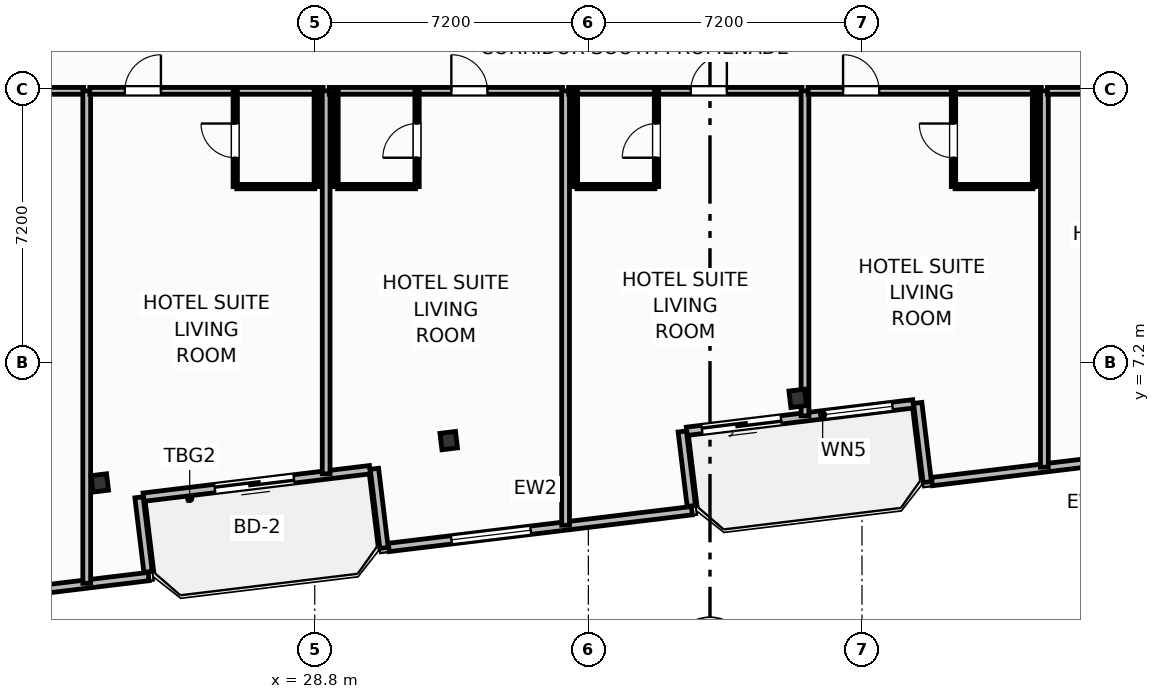
"""IFC4 building model, lengths in metres.
Left out: names, types, materials, properties, quantities, classifications, styles, units other than length and angle.
Written with IfcOpenShell. Run it as: python <this file> out.ifc"""

import sys

from ifc_helpers import new_model, si_unit, direction, frame, frame_2d, origin, origin_2d, place, context, subcontext, project, spatial, rectangle, i_section, extrude, element, fill, save


model = new_model("IFC4")
c1 = context("Model", 3, precision=1e-05, world=origin(), true_north=direction((0.0, 1.0)))
c2 = subcontext(c1, "Body", "Model", "MODEL_VIEW")
j1 = project(units=[si_unit("LENGTHUNIT", "METRE"), si_unit("PLANEANGLEUNIT", "RADIAN")], contexts=[c1])
p1 = place(None, origin())
s1 = spatial("IfcSite", under=j1, at=p1, CompositionType="ELEMENT")
p2 = place(p1, origin())
s2 = spatial("IfcBuilding", under=s1, at=p2, CompositionType="ELEMENT")
p3 = place(p2, frame((0.0, 0.0, 200.5)))
s3 = spatial("IfcBuildingStorey", under=s2, at=p3, CompositionType="ELEMENT", Elevation=200.5)
for number, where, z_axis, x_axis in (
    (1, (23.143, 4.033, 0.0), (0.0, 0.0, 1.0), (0.993, 0.12, 0.0)),
    (2, (32.325, 5.146, 0.0), (0.0, 0.0, 1.0), (0.993, 0.12, 0.0)),
    (3, (41.508, 6.26, 0.0), (0.0, 0.0, 1.0), (0.993, 0.12, 0.0)),
):
    element("IfcColumn", number, at=place(p3, frame(where, z_axis=z_axis, x_axis=x_axis)), inside=s3, PredefinedType="COLUMN", context=c2, shape_type="SweptSolid", body=[
        extrude(i_section(OverallWidth=0.412, OverallDepth=0.435, WebThickness=0.036, FlangeThickness=0.057, FilletRadius=0.025, at=origin_2d()), origin(), (0.0, 0.0, 1.0), 3.7),
    ])
p4 = place(p3, frame((30.252, 4.381, 0.0), z_axis=(0.0, 0.0, 1.0), x_axis=(-0.992735402148, -0.120318000826, 0.0)))
e4 = element("IfcWall", 4, at=p4, inside=s3, PredefinedType="SOLIDWALL", context=c2, shape_type="SweptSolid", body=[
    extrude(rectangle(XDim=6.0, YDim=0.22, at=frame_2d((3.0, 0.0))), origin(), (0.0, 0.0, 1.0), 2.73),
])
p5 = place(p4, frame((2.012, 0.0, 0.0)))
e5 = element("IfcOpeningElement", 5, at=p5, cuts=e4, PredefinedType="OPENING", context=c2, shape_type="SweptSolid", body=[
    extrude(rectangle(XDim=2.1, YDim=2.3, at=frame_2d((1.05, 1.15))), frame((0.0, 0.12, 0.0), z_axis=(0.0, -1.0, 0.0), x_axis=(1.0, 0.0, 0.0)), (0.0, 0.0, 1.0), 0.24),
])
p6 = place(p3, frame((44.548, 6.114, 0.0), z_axis=(0.0, 0.0, 1.0), x_axis=(-0.992735402148, -0.120318000826, 0.0)))
e6 = element("IfcWall", 6, at=p6, inside=s3, PredefinedType="SOLIDWALL", context=c2, shape_type="SweptSolid", body=[
    extrude(rectangle(XDim=6.0, YDim=0.22, at=frame_2d((3.0, 0.0))), origin(), (0.0, 0.0, 1.0), 2.73),
])
p7 = place(p6, frame((3.5, 0.0, 0.0)))
e7 = element("IfcOpeningElement", 7, at=p7, cuts=e6, PredefinedType="OPENING", context=c2, shape_type="SweptSolid", body=[
    extrude(rectangle(XDim=2.1, YDim=2.3, at=frame_2d((1.05, 1.15))), frame((0.0, 0.12, 0.0), z_axis=(0.0, -1.0, 0.0), x_axis=(1.0, 0.0, 0.0)), (0.0, 0.0, 1.0), 0.24),
])
p8 = place(p6, frame((0.55, 0.0, 0.75)))
e8 = element("IfcOpeningElement", 8, at=p8, cuts=e6, PredefinedType="OPENING", context=c2, shape_type="SweptSolid", body=[
    extrude(rectangle(XDim=1.85, YDim=1.75, at=frame_2d((0.925, 0.875))), frame((0.0, 0.12, 0.0), z_axis=(0.0, -1.0, 0.0), x_axis=(1.0, 0.0, 0.0)), (0.0, 0.0, 1.0), 0.24),
])
p9 = place(p3, frame((11.972, 0.06, 0.0), z_axis=(0.0, 0.0, 1.0), x_axis=(0.992732021049, 0.120345894751, 0.0)))
e9 = element("IfcWall", 9, at=p9, inside=s3, PredefinedType="SOLIDWALL", context=c2, shape_type="SweptSolid", body=[
    extrude(rectangle(XDim=12.547, YDim=0.22, at=frame_2d((6.274, 0.0))), origin(), (0.0, 0.0, 1.0), 2.73),
])
p10 = place(p9, frame((5.224, 0.0, 0.8)))
e10 = element("IfcOpeningElement", 10, at=p10, cuts=e9, PredefinedType="OPENING", context=c2, shape_type="SweptSolid", body=[
    extrude(rectangle(XDim=2.1, YDim=1.75, at=frame_2d((1.05, 0.875))), frame((0.0, 0.12, 0.0), z_axis=(0.0, -1.0, 0.0), x_axis=(1.0, 0.0, 0.0)), (0.0, 0.0, 1.0), 0.24),
])
p11 = place(p3, frame((24.413, 1.694, 0.0), z_axis=(0.0, 0.0, 1.0), x_axis=(-0.120290754542, 0.992738703976, 0.0)))
e11 = element("IfcWall", 11, at=p11, inside=s3, PredefinedType="SOLIDWALL", context=c2, shape_type="SweptSolid", body=[
    extrude(rectangle(XDim=1.975, YDim=0.22, at=frame_2d((0.987, 0.0))), origin(), (0.0, 0.0, 1.0), 2.73),
])
p12 = place(p3, frame((30.37, 4.406, 0.0), z_axis=(0.0, 0.0, 1.0), x_axis=(0.120327895535, -0.992734202874, 0.0)))
e12 = element("IfcWall", 12, at=p12, inside=s3, PredefinedType="SOLIDWALL", context=c2, shape_type="SweptSolid", body=[
    extrude(rectangle(XDim=2.1, YDim=0.22, at=frame_2d((1.05, 0.0))), origin(), (0.0, 0.0, 1.0), 2.73),
])
p13 = place(p3, frame((30.747, 2.336, 0.0), z_axis=(0.0, 0.0, 1.0), x_axis=(0.992731032022, 0.120354052946, 0.0)))
e13 = element("IfcWall", 13, at=p13, inside=s3, PredefinedType="SOLIDWALL", context=c2, shape_type="SweptSolid", body=[
    extrude(rectangle(XDim=8.035, YDim=0.22, at=frame_2d((4.018, 0.0))), origin(), (0.0, 0.0, 1.0), 2.73),
])
p14 = place(p13, frame((1.662, 0.0, 0.8)))
e14 = element("IfcOpeningElement", 14, at=p14, cuts=e13, PredefinedType="OPENING", context=c2, shape_type="SweptSolid", body=[
    extrude(rectangle(XDim=2.1, YDim=1.75, at=frame_2d((1.05, 0.875))), frame((0.0, 0.12, 0.0), z_axis=(0.0, -1.0, 0.0), x_axis=(1.0, 0.0, 0.0)), (0.0, 0.0, 1.0), 0.24),
])
p15 = place(p3, frame((38.709, 3.427, 0.0), z_axis=(0.0, 0.0, 1.0), x_axis=(-0.120397815541, 0.992725725472, 0.0)))
e15 = element("IfcWall", 15, at=p15, inside=s3, PredefinedType="SOLIDWALL", context=c2, shape_type="SweptSolid", body=[
    extrude(rectangle(XDim=1.975, YDim=0.22, at=frame_2d((0.988, 0.0))), origin(), (0.0, 0.0, 1.0), 2.73),
])
p16 = place(p3, frame((44.666, 6.138, 0.0), z_axis=(0.0, 0.0, 1.0), x_axis=(0.120327895535, -0.992734202874, 0.0)))
e16 = element("IfcWall", 16, at=p16, inside=s3, PredefinedType="SOLIDWALL", context=c2, shape_type="SweptSolid", body=[
    extrude(rectangle(XDim=2.1, YDim=0.22, at=frame_2d((1.05, 0.0))), origin(), (0.0, 0.0, 1.0), 2.73),
])
p17 = place(p3, frame((45.042, 4.069, 0.0), z_axis=(0.0, 0.0, 1.0), x_axis=(0.992731032022, 0.120354052946, 0.0)))
e17 = element("IfcWall", 17, at=p17, inside=s3, PredefinedType="SOLIDWALL", context=c2, shape_type="SweptSolid", body=[
    extrude(rectangle(XDim=8.035, YDim=0.22, at=frame_2d((4.018, 0.0))), origin(), (0.0, 0.0, 1.0), 2.73),
])
p18 = place(p17, frame((4.273, 0.0, 0.8)))
e18 = element("IfcOpeningElement", 18, at=p18, cuts=e17, PredefinedType="OPENING", context=c2, shape_type="SweptSolid", body=[
    extrude(rectangle(XDim=2.1, YDim=1.75, at=frame_2d((1.05, 0.875))), frame((0.0, 0.12, 0.0), z_axis=(0.0, -1.0, 0.0), x_axis=(1.0, 0.0, 0.0)), (0.0, 0.0, 1.0), 0.24),
])
p19 = place(p3, frame((16.58, 14.35, 0.0), z_axis=(0.0, 0.0, 1.0), x_axis=(1.0, 0.0, 0.0)))
e19 = element("IfcWall", 19, at=p19, inside=s3, PredefinedType="PARTITIONING", context=c2, shape_type="SweptSolid", body=[
    extrude(rectangle(XDim=6.14, YDim=0.18, at=frame_2d((3.07, 0.0))), origin(), (0.0, 0.0, 1.0), 3.45),
])
p20 = place(p19, frame((3.214, 0.0, 0.0)))
e20 = element("IfcOpeningElement", 20, at=p20, cuts=e19, PredefinedType="OPENING", context=c2, shape_type="SweptSolid", body=[
    extrude(rectangle(XDim=0.95, YDim=2.15, at=frame_2d((0.475, 1.075))), frame((0.0, 0.1, 0.0), z_axis=(0.0, -1.0, 0.0), x_axis=(1.0, 0.0, 0.0)), (0.0, 0.0, 1.0), 0.2),
])
p21 = place(p3, frame((22.8, 1.393, 0.0), z_axis=(0.0, 0.0, 1.0), x_axis=(0.0, 1.0, 0.0)))
e21 = element("IfcWall", 21, at=p21, inside=s3, PredefinedType="PARTITIONING", context=c2, shape_type="SweptSolid", body=[
    extrude(rectangle(XDim=12.958, YDim=0.205, at=frame_2d((6.479, 0.0))), origin(), (0.0, 0.0, 1.0), 3.45),
])
p22 = place(p3, frame((22.88, 14.35, 0.0), z_axis=(0.0, 0.0, 1.0), x_axis=(1.0, 0.0, 0.0)))
e22 = element("IfcWall", 22, at=p22, inside=s3, PredefinedType="PARTITIONING", context=c2, shape_type="SweptSolid", body=[
    extrude(rectangle(XDim=6.14, YDim=0.18, at=frame_2d((3.07, 0.0))), origin(), (0.0, 0.0, 1.0), 3.45),
])
p23 = place(p22, frame((0.922, 0.0, 0.0)))
e23 = element("IfcOpeningElement", 23, at=p23, cuts=e22, PredefinedType="OPENING", context=c2, shape_type="SweptSolid", body=[
    extrude(rectangle(XDim=0.95, YDim=2.15, at=frame_2d((0.475, 1.075))), frame((0.0, 0.1, 0.0), z_axis=(0.0, -1.0, 0.0), x_axis=(1.0, 0.0, 0.0)), (0.0, 0.0, 1.0), 0.2),
])
p24 = place(p3, frame((26.748, 11.83, 0.0), z_axis=(0.0, 0.0, 1.0), x_axis=(1.0, 0.0, 0.0)))
e24 = element("IfcWall", 24, at=p24, inside=s3, PredefinedType="PARTITIONING", context=c2, shape_type="SweptSolid", body=[
    extrude(rectangle(XDim=2.052, YDim=0.115, at=frame_2d((1.026, 0.0))), origin(), (0.0, 0.0, 1.0), 3.45),
])
p25 = place(p3, frame((26.708, 11.83, 0.0), z_axis=(0.0, 0.0, 1.0), x_axis=(0.0, 1.0, 0.0)))
e25 = element("IfcWall", 25, at=p25, inside=s3, PredefinedType="PARTITIONING", context=c2, shape_type="SweptSolid", body=[
    extrude(rectangle(XDim=2.52, YDim=0.115, at=frame_2d((1.26, 0.0))), origin(), (0.0, 0.0, 1.0), 3.45),
])
p26 = place(p25, frame((0.76, 0.0, 0.0)))
e26 = element("IfcOpeningElement", 26, at=p26, cuts=e25, PredefinedType="OPENING", context=c2, shape_type="SweptSolid", body=[
    extrude(rectangle(XDim=0.9, YDim=2.05, at=frame_2d((0.45, 1.025))), frame((0.0, 0.067, 0.0), z_axis=(0.0, -1.0, 0.0), x_axis=(1.0, 0.0, 0.0)), (0.0, 0.0, 1.0), 0.135),
])
p27 = place(p3, frame((28.84, 11.83, 0.0), z_axis=(0.0, 0.0, 1.0), x_axis=(0.0, 1.0, 0.0)))
e27 = element("IfcWall", 27, at=p27, inside=s3, PredefinedType="PARTITIONING", context=c2, shape_type="SweptSolid", body=[
    extrude(rectangle(XDim=2.52, YDim=0.115, at=frame_2d((1.26, 0.0))), origin(), (0.0, 0.0, 1.0), 3.45),
])
p28 = place(p3, frame((29.1, 4.272, 0.0), z_axis=(0.0, 0.0, 1.0), x_axis=(0.0, 1.0, 0.0)))
e28 = element("IfcWall", 28, at=p28, inside=s3, PredefinedType="PARTITIONING", context=c2, shape_type="SweptSolid", body=[
    extrude(rectangle(XDim=10.078, YDim=0.205, at=frame_2d((5.039, 0.0))), origin(), (0.0, 0.0, 1.0), 3.45),
])
p29 = place(p3, frame((29.18, 14.35, 0.0), z_axis=(0.0, 0.0, 1.0), x_axis=(1.0, 0.0, 0.0)))
e29 = element("IfcWall", 29, at=p29, inside=s3, PredefinedType="PARTITIONING", context=c2, shape_type="SweptSolid", body=[
    extrude(rectangle(XDim=6.14, YDim=0.18, at=frame_2d((3.07, 0.0))), origin(), (0.0, 0.0, 1.0), 3.45),
])
p30 = place(p29, frame((3.214, 0.0, 0.0)))
e30 = element("IfcOpeningElement", 30, at=p30, cuts=e29, PredefinedType="OPENING", context=c2, shape_type="SweptSolid", body=[
    extrude(rectangle(XDim=0.95, YDim=2.15, at=frame_2d((0.475, 1.075))), frame((0.0, 0.1, 0.0), z_axis=(0.0, -1.0, 0.0), x_axis=(1.0, 0.0, 0.0)), (0.0, 0.0, 1.0), 0.2),
])
p31 = place(p3, frame((29.4, 11.83, 0.0), z_axis=(0.0, 0.0, 1.0), x_axis=(1.0, 0.0, 0.0)))
e31 = element("IfcWall", 31, at=p31, inside=s3, PredefinedType="PARTITIONING", context=c2, shape_type="SweptSolid", body=[
    extrude(rectangle(XDim=2.052, YDim=0.115, at=frame_2d((1.026, 0.0))), origin(), (0.0, 0.0, 1.0), 3.45),
])
p32 = place(p3, frame((31.492, 11.83, 0.0), z_axis=(0.0, 0.0, 1.0), x_axis=(0.0, 1.0, 0.0)))
e32 = element("IfcWall", 32, at=p32, inside=s3, PredefinedType="PARTITIONING", context=c2, shape_type="SweptSolid", body=[
    extrude(rectangle(XDim=2.52, YDim=0.115, at=frame_2d((1.26, 0.0))), origin(), (0.0, 0.0, 1.0), 3.45),
])
p33 = place(p32, frame((0.76, 0.0, 0.0)))
e33 = element("IfcOpeningElement", 33, at=p33, cuts=e32, PredefinedType="OPENING", context=c2, shape_type="SweptSolid", body=[
    extrude(rectangle(XDim=0.9, YDim=2.05, at=frame_2d((0.45, 1.025))), frame((0.0, 0.067, 0.0), z_axis=(0.0, -1.0, 0.0), x_axis=(1.0, 0.0, 0.0)), (0.0, 0.0, 1.0), 0.135),
])
p34 = place(p3, frame((29.36, 11.83, 0.0), z_axis=(0.0, 0.0, 1.0), x_axis=(0.0, 1.0, 0.0)))
e34 = element("IfcWall", 34, at=p34, inside=s3, PredefinedType="PARTITIONING", context=c2, shape_type="SweptSolid", body=[
    extrude(rectangle(XDim=2.52, YDim=0.115, at=frame_2d((1.26, 0.0))), origin(), (0.0, 0.0, 1.0), 3.45),
])
p35 = place(p3, frame((35.4, 2.92, 0.0), z_axis=(0.0, 0.0, 1.0), x_axis=(0.0, 1.0, 0.0)))
e35 = element("IfcWall", 35, at=p35, inside=s3, PredefinedType="PARTITIONING", context=c2, shape_type="SweptSolid", body=[
    extrude(rectangle(XDim=11.43, YDim=0.205, at=frame_2d((5.715, 0.0))), origin(), (0.0, 0.0, 1.0), 3.45),
])
p36 = place(p3, frame((35.48, 14.35, 0.0), z_axis=(0.0, 0.0, 1.0), x_axis=(1.0, 0.0, 0.0)))
e36 = element("IfcWall", 36, at=p36, inside=s3, PredefinedType="PARTITIONING", context=c2, shape_type="SweptSolid", body=[
    extrude(rectangle(XDim=6.14, YDim=0.18, at=frame_2d((3.07, 0.0))), origin(), (0.0, 0.0, 1.0), 3.45),
])
p37 = place(p36, frame((3.214, 0.0, 0.0)))
e37 = element("IfcOpeningElement", 37, at=p37, cuts=e36, PredefinedType="OPENING", context=c2, shape_type="SweptSolid", body=[
    extrude(rectangle(XDim=0.95, YDim=2.15, at=frame_2d((0.475, 1.075))), frame((0.0, 0.1, 0.0), z_axis=(0.0, -1.0, 0.0), x_axis=(1.0, 0.0, 0.0)), (0.0, 0.0, 1.0), 0.2),
])
p38 = place(p3, frame((35.7, 11.83, 0.0), z_axis=(0.0, 0.0, 1.0), x_axis=(1.0, 0.0, 0.0)))
e38 = element("IfcWall", 38, at=p38, inside=s3, PredefinedType="PARTITIONING", context=c2, shape_type="SweptSolid", body=[
    extrude(rectangle(XDim=2.052, YDim=0.115, at=frame_2d((1.026, 0.0))), origin(), (0.0, 0.0, 1.0), 3.45),
])
p39 = place(p3, frame((37.792, 11.83, 0.0), z_axis=(0.0, 0.0, 1.0), x_axis=(0.0, 1.0, 0.0)))
e39 = element("IfcWall", 39, at=p39, inside=s3, PredefinedType="PARTITIONING", context=c2, shape_type="SweptSolid", body=[
    extrude(rectangle(XDim=2.52, YDim=0.115, at=frame_2d((1.26, 0.0))), origin(), (0.0, 0.0, 1.0), 3.45),
])
p40 = place(p39, frame((0.76, 0.0, 0.0)))
e40 = element("IfcOpeningElement", 40, at=p40, cuts=e39, PredefinedType="OPENING", context=c2, shape_type="SweptSolid", body=[
    extrude(rectangle(XDim=0.9, YDim=2.05, at=frame_2d((0.45, 1.025))), frame((0.0, 0.067, 0.0), z_axis=(0.0, -1.0, 0.0), x_axis=(1.0, 0.0, 0.0)), (0.0, 0.0, 1.0), 0.135),
])
p41 = place(p3, frame((35.66, 11.83, 0.0), z_axis=(0.0, 0.0, 1.0), x_axis=(0.0, 1.0, 0.0)))
e41 = element("IfcWall", 41, at=p41, inside=s3, PredefinedType="PARTITIONING", context=c2, shape_type="SweptSolid", body=[
    extrude(rectangle(XDim=2.52, YDim=0.115, at=frame_2d((1.26, 0.0))), origin(), (0.0, 0.0, 1.0), 3.45),
])
p42 = place(p3, frame((41.7, 5.799, 0.0), z_axis=(0.0, 0.0, 1.0), x_axis=(0.0, 1.0, 0.0)))
e42 = element("IfcWall", 42, at=p42, inside=s3, PredefinedType="PARTITIONING", context=c2, shape_type="SweptSolid", body=[
    extrude(rectangle(XDim=8.551, YDim=0.205, at=frame_2d((4.275, 0.0))), origin(), (0.0, 0.0, 1.0), 2.662),
])
p43 = place(p3, frame((41.78, 14.35, 0.0), z_axis=(0.0, 0.0, 1.0), x_axis=(1.0, 0.0, 0.0)))
e43 = element("IfcWall", 43, at=p43, inside=s3, PredefinedType="PARTITIONING", context=c2, shape_type="SweptSolid", body=[
    extrude(rectangle(XDim=6.14, YDim=0.18, at=frame_2d((3.07, 0.0))), origin(), (0.0, 0.0, 1.0), 3.45),
])
p44 = place(p43, frame((0.922, 0.0, 0.0)))
e44 = element("IfcOpeningElement", 44, at=p44, cuts=e43, PredefinedType="OPENING", context=c2, shape_type="SweptSolid", body=[
    extrude(rectangle(XDim=0.95, YDim=2.15, at=frame_2d((0.475, 1.075))), frame((0.0, 0.1, 0.0), z_axis=(0.0, -1.0, 0.0), x_axis=(1.0, 0.0, 0.0)), (0.0, 0.0, 1.0), 0.2),
])
p45 = place(p3, frame((45.648, 11.83, 0.0), z_axis=(0.0, 0.0, 1.0), x_axis=(1.0, 0.0, 0.0)))
e45 = element("IfcWall", 45, at=p45, inside=s3, PredefinedType="PARTITIONING", context=c2, shape_type="SweptSolid", body=[
    extrude(rectangle(XDim=2.052, YDim=0.115, at=frame_2d((1.026, 0.0))), origin(), (0.0, 0.0, 1.0), 3.45),
])
p46 = place(p3, frame((45.608, 11.83, 0.0), z_axis=(0.0, 0.0, 1.0), x_axis=(0.0, 1.0, 0.0)))
e46 = element("IfcWall", 46, at=p46, inside=s3, PredefinedType="PARTITIONING", context=c2, shape_type="SweptSolid", body=[
    extrude(rectangle(XDim=2.52, YDim=0.115, at=frame_2d((1.26, 0.0))), origin(), (0.0, 0.0, 1.0), 3.45),
])
p47 = place(p46, frame((0.76, 0.0, 0.0)))
e47 = element("IfcOpeningElement", 47, at=p47, cuts=e46, PredefinedType="OPENING", context=c2, shape_type="SweptSolid", body=[
    extrude(rectangle(XDim=0.9, YDim=2.05, at=frame_2d((0.45, 1.025))), frame((0.0, 0.067, 0.0), z_axis=(0.0, -1.0, 0.0), x_axis=(1.0, 0.0, 0.0)), (0.0, 0.0, 1.0), 0.135),
])
p48 = place(p3, frame((47.74, 11.83, 0.0), z_axis=(0.0, 0.0, 1.0), x_axis=(0.0, 1.0, 0.0)))
e48 = element("IfcWall", 48, at=p48, inside=s3, PredefinedType="PARTITIONING", context=c2, shape_type="SweptSolid", body=[
    extrude(rectangle(XDim=2.52, YDim=0.115, at=frame_2d((1.26, 0.0))), origin(), (0.0, 0.0, 1.0), 3.45),
])
p49 = place(p3, frame((48.0, 4.448, 0.0), z_axis=(0.0, 0.0, 1.0), x_axis=(0.0, 1.0, 0.0)))
e49 = element("IfcWall", 49, at=p49, inside=s3, PredefinedType="PARTITIONING", context=c2, shape_type="SweptSolid", body=[
    extrude(rectangle(XDim=9.903, YDim=0.205, at=frame_2d((4.951, 0.0))), origin(), (0.0, 0.0, 1.0), 3.45),
])
p50 = place(p3, frame((48.08, 14.35, 0.0), z_axis=(0.0, 0.0, 1.0), x_axis=(1.0, 0.0, 0.0)))
e50 = element("IfcWall", 50, at=p50, inside=s3, PredefinedType="PARTITIONING", context=c2, shape_type="SweptSolid", body=[
    extrude(rectangle(XDim=6.14, YDim=0.18, at=frame_2d((3.07, 0.0))), origin(), (0.0, 0.0, 1.0), 3.45),
])
p51 = place(p50, frame((0.922, 0.0, 0.0)))
e51 = element("IfcOpeningElement", 51, at=p51, cuts=e50, PredefinedType="OPENING", context=c2, shape_type="SweptSolid", body=[
    extrude(rectangle(XDim=0.95, YDim=2.15, at=frame_2d((0.475, 1.075))), frame((0.0, 0.1, 0.0), z_axis=(0.0, -1.0, 0.0), x_axis=(1.0, 0.0, 0.0)), (0.0, 0.0, 1.0), 0.2),
])
p52 = place(p5, origin())
e52 = element("IfcDoor", 52, at=p52, inside=s3, OperationType="SLIDING_TO_LEFT", PredefinedType="DOOR", context=c2, shape_type="SweptSolid", body=[
    extrude(rectangle(XDim=2.1, YDim=2.3, at=frame_2d((1.05, 1.15))), frame((0.0, 0.025, 0.0), z_axis=(0.0, -1.0, 0.0), x_axis=(1.0, 0.0, 0.0)), (0.0, 0.0, 1.0), 0.05),
])
fill(e5, e52)
p53 = place(p7, origin())
e53 = element("IfcDoor", 53, at=p53, inside=s3, OperationType="SLIDING_TO_LEFT", PredefinedType="DOOR", context=c2, shape_type="SweptSolid", body=[
    extrude(rectangle(XDim=2.1, YDim=2.3, at=frame_2d((1.05, 1.15))), frame((0.0, 0.025, 0.0), z_axis=(0.0, -1.0, 0.0), x_axis=(1.0, 0.0, 0.0)), (0.0, 0.0, 1.0), 0.05),
])
fill(e7, e53)
p54 = place(p8, origin())
e54 = element("IfcWindow", 54, at=p54, inside=s3, PartitioningType="SINGLE_PANEL", PredefinedType="WINDOW", context=c2, shape_type="SweptSolid", body=[
    extrude(rectangle(XDim=1.85, YDim=1.75, at=frame_2d((0.925, 0.875))), frame((0.0, 0.03, 0.0), z_axis=(0.0, -1.0, 0.0), x_axis=(1.0, 0.0, 0.0)), (0.0, 0.0, 1.0), 0.06),
])
fill(e8, e54)
p55 = place(p14, origin())
e55 = element("IfcWindow", 55, at=p55, inside=s3, PartitioningType="SINGLE_PANEL", PredefinedType="WINDOW", context=c2, shape_type="SweptSolid", body=[
    extrude(rectangle(XDim=2.1, YDim=1.75, at=frame_2d((1.05, 0.875))), frame((0.0, 0.03, 0.0), z_axis=(0.0, -1.0, 0.0), x_axis=(1.0, 0.0, 0.0)), (0.0, 0.0, 1.0), 0.06),
])
fill(e14, e55)
p56 = place(p23, origin())
e56 = element("IfcDoor", 56, at=p56, inside=s3, OperationType="SINGLE_SWING_RIGHT", PredefinedType="DOOR", context=c2, shape_type="SweptSolid", body=[
    extrude(rectangle(XDim=0.95, YDim=2.15, at=frame_2d((0.475, 1.075))), frame((0.0, 0.025, 0.0), z_axis=(0.0, -1.0, 0.0), x_axis=(1.0, 0.0, 0.0)), (0.0, 0.0, 1.0), 0.05),
])
fill(e23, e56)
p57 = place(p26, origin())
e57 = element("IfcDoor", 57, at=p57, inside=s3, OperationType="SINGLE_SWING_RIGHT", PredefinedType="DOOR", context=c2, shape_type="SweptSolid", body=[
    extrude(rectangle(XDim=0.9, YDim=2.05, at=frame_2d((0.45, 1.025))), frame((0.0, 0.025, 0.0), z_axis=(0.0, -1.0, 0.0), x_axis=(1.0, 0.0, 0.0)), (0.0, 0.0, 1.0), 0.05),
])
fill(e26, e57)
p58 = place(p30, origin())
e58 = element("IfcDoor", 58, at=p58, inside=s3, OperationType="SINGLE_SWING_LEFT", PredefinedType="DOOR", context=c2, shape_type="SweptSolid", body=[
    extrude(rectangle(XDim=0.95, YDim=2.15, at=frame_2d((0.475, 1.075))), frame((0.0, 0.025, 0.0), z_axis=(0.0, -1.0, 0.0), x_axis=(1.0, 0.0, 0.0)), (0.0, 0.0, 1.0), 0.05),
])
fill(e30, e58)
p59 = place(p33, origin())
e59 = element("IfcDoor", 59, at=p59, inside=s3, OperationType="SINGLE_SWING_LEFT", PredefinedType="DOOR", context=c2, shape_type="SweptSolid", body=[
    extrude(rectangle(XDim=0.9, YDim=2.05, at=frame_2d((0.45, 1.025))), frame((0.0, 0.025, 0.0), z_axis=(0.0, -1.0, 0.0), x_axis=(1.0, 0.0, 0.0)), (0.0, 0.0, 1.0), 0.05),
])
fill(e33, e59)
p60 = place(p37, origin())
e60 = element("IfcDoor", 60, at=p60, inside=s3, OperationType="SINGLE_SWING_RIGHT", PredefinedType="DOOR", context=c2, shape_type="SweptSolid", body=[
    extrude(rectangle(XDim=0.95, YDim=2.15, at=frame_2d((0.475, 1.075))), frame((0.0, 0.025, 0.0), z_axis=(0.0, -1.0, 0.0), x_axis=(1.0, 0.0, 0.0)), (0.0, 0.0, 1.0), 0.05),
])
fill(e37, e60)
p61 = place(p40, origin())
e61 = element("IfcDoor", 61, at=p61, inside=s3, OperationType="SINGLE_SWING_LEFT", PredefinedType="DOOR", context=c2, shape_type="SweptSolid", body=[
    extrude(rectangle(XDim=0.9, YDim=2.05, at=frame_2d((0.45, 1.025))), frame((0.0, 0.025, 0.0), z_axis=(0.0, -1.0, 0.0), x_axis=(1.0, 0.0, 0.0)), (0.0, 0.0, 1.0), 0.05),
])
fill(e40, e61)
p62 = place(p44, origin())
e62 = element("IfcDoor", 62, at=p62, inside=s3, OperationType="SINGLE_SWING_LEFT", PredefinedType="DOOR", context=c2, shape_type="SweptSolid", body=[
    extrude(rectangle(XDim=0.95, YDim=2.15, at=frame_2d((0.475, 1.075))), frame((0.0, 0.025, 0.0), z_axis=(0.0, -1.0, 0.0), x_axis=(1.0, 0.0, 0.0)), (0.0, 0.0, 1.0), 0.05),
])
fill(e44, e62)
p63 = place(p47, origin())
e63 = element("IfcDoor", 63, at=p63, inside=s3, OperationType="SINGLE_SWING_RIGHT", PredefinedType="DOOR", context=c2, shape_type="SweptSolid", body=[
    extrude(rectangle(XDim=0.9, YDim=2.05, at=frame_2d((0.45, 1.025))), frame((0.0, 0.025, 0.0), z_axis=(0.0, -1.0, 0.0), x_axis=(1.0, 0.0, 0.0)), (0.0, 0.0, 1.0), 0.05),
])
fill(e47, e63)
save(model, sys.argv[1])
